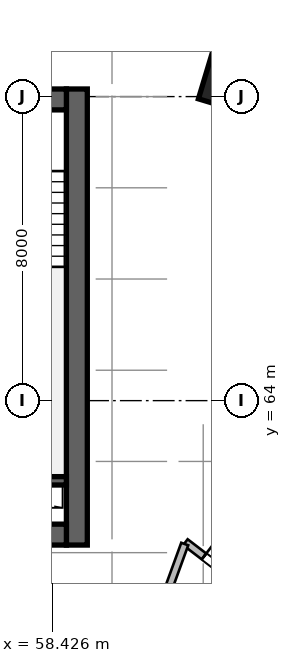
"""IFC4 building model, lengths in metres.
Left out: names, types, materials, properties, quantities, classifications, styles, units other than length and angle.
Written with IfcOpenShell. Run it as: python <this file> out.ifc"""

import sys

from ifc_helpers import new_model, si_unit, direction, frame, frame_2d, origin, origin_2d, place, context, subcontext, project, spatial, rectangle, extrude, source, transform, mapped, element, fill, save


model = new_model("IFC4")
c1 = context("Model", 3, precision=1e-05, world=origin(), true_north=direction((0.0, 1.0)))
c2 = subcontext(c1, "Body", "Model", "MODEL_VIEW")
j1 = project(units=[si_unit("LENGTHUNIT", "METRE"), si_unit("PLANEANGLEUNIT", "RADIAN")], contexts=[c1])
p1 = place(None, origin())
s1 = spatial("IfcSite", under=j1, at=p1, CompositionType="ELEMENT")
p2 = place(p1, origin())
s2 = spatial("IfcBuilding", under=s1, at=p2, CompositionType="ELEMENT")
p3 = place(p2, frame((0.0, 0.0, 42.6)))
s3 = spatial("IfcBuildingStorey", under=s2, at=p3, CompositionType="ELEMENT", Elevation=42.6)
m1 = source(origin(), c2, "Body", "SweptSolid", [
    extrude(rectangle(XDim=12.0, YDim=0.55, at=frame_2d((6.0, 0.0))), origin(), (0.0, 0.0, 1.0), 3.6),
])
p4 = place(p3, frame((59.075, 60.2, 0.0), z_axis=(0.0, 0.0, 1.0), x_axis=(0.0, 1.0, 0.0)))
e1 = element("IfcWall", 1, at=p4, inside=s3, PredefinedType="SHEAR", context=c2, shape_type="MappedRepresentation", body=[
    mapped(m1, transform((0.0, 0.0, 0.0), scale=1.0)),
])
m2 = source(origin(), c2, "Body", "SweptSolid", [
    extrude(rectangle(XDim=21.6, YDim=0.55, at=frame_2d((10.8, 0.0))), origin(), (0.0, 0.0, 1.0), 3.6),
])
p5 = place(p3, frame((37.2, 60.475, 0.0), z_axis=(0.0, 0.0, 1.0), x_axis=(1.0, 0.0, 0.0)))
e2 = element("IfcWall", 2, at=p5, inside=s3, PredefinedType="SHEAR", context=c2, shape_type="MappedRepresentation", body=[
    mapped(m2, transform((0.0, 0.0, 0.0), scale=1.0)),
])
p6 = place(p5, frame((1.1, 0.0, 0.0)))
e3 = element("IfcOpeningElement", 3, at=p6, cuts=e2, PredefinedType="OPENING", context=c2, shape_type="SweptSolid", body=[
    extrude(rectangle(XDim=1.15, YDim=2.15, at=frame_2d((0.575, 1.075))), frame((0.0, 0.285, 0.0), z_axis=(0.0, -1.0, 0.0), x_axis=(1.0, 0.0, 0.0)), (0.0, 0.0, 1.0), 0.57),
])
p7 = place(p5, frame((19.5, 0.0, 0.0)))
e4 = element("IfcOpeningElement", 4, at=p7, cuts=e2, PredefinedType="OPENING", context=c2, shape_type="SweptSolid", body=[
    extrude(rectangle(XDim=0.9, YDim=2.1, at=frame_2d((0.45, 1.05))), frame((0.0, 0.285, 0.0), z_axis=(0.0, -1.0, 0.0), x_axis=(1.0, 0.0, 0.0)), (0.0, 0.0, 1.0), 0.57),
])
p8 = place(p5, frame((12.02, 0.0, 0.0)))
e5 = element("IfcOpeningElement", 5, at=p8, cuts=e2, PredefinedType="OPENING", context=c2, shape_type="SweptSolid", body=[
    extrude(rectangle(XDim=1.6, YDim=2.15, at=frame_2d((0.8, 1.075))), frame((0.0, 0.285, 0.0), z_axis=(0.0, -1.0, 0.0), x_axis=(1.0, 0.0, 0.0)), (0.0, 0.0, 1.0), 0.57),
])
p9 = place(p3, frame((37.2, 71.925, 0.0), z_axis=(0.0, 0.0, 1.0), x_axis=(1.0, 0.0, 0.0)))
e6 = element("IfcWall", 6, at=p9, inside=s3, PredefinedType="SHEAR", context=c2, shape_type="MappedRepresentation", body=[
    mapped(m2, transform((0.0, 0.0, 0.0), scale=1.0)),
])
p10 = place(p9, frame((1.2, 0.0, 0.0)))
e7 = element("IfcOpeningElement", 7, at=p10, cuts=e6, PredefinedType="OPENING", context=c2, shape_type="SweptSolid", body=[
    extrude(rectangle(XDim=0.9, YDim=2.1, at=frame_2d((0.45, 1.05))), frame((0.0, 0.285, 0.0), z_axis=(0.0, -1.0, 0.0), x_axis=(1.0, 0.0, 0.0)), (0.0, 0.0, 1.0), 0.57),
])
p11 = place(p9, frame((14.7, 0.0, 0.0)))
e8 = element("IfcOpeningElement", 8, at=p11, cuts=e6, PredefinedType="OPENING", context=c2, shape_type="SweptSolid", body=[
    extrude(rectangle(XDim=1.2, YDim=2.15, at=frame_2d((0.6, 1.075))), frame((0.0, 0.285, 0.0), z_axis=(0.0, -1.0, 0.0), x_axis=(1.0, 0.0, 0.0)), (0.0, 0.0, 1.0), 0.57),
])
p12 = place(p9, frame((4.15, 0.0, 0.0)))
e9 = element("IfcOpeningElement", 9, at=p12, cuts=e6, PredefinedType="OPENING", context=c2, shape_type="SweptSolid", body=[
    extrude(rectangle(XDim=1.3, YDim=2.15, at=frame_2d((0.65, 1.075))), frame((0.0, 0.285, 0.0), z_axis=(0.0, -1.0, 0.0), x_axis=(1.0, 0.0, 0.0)), (0.0, 0.0, 1.0), 0.57),
])
p13 = place(p9, frame((7.25, 0.0, 0.0)))
e10 = element("IfcOpeningElement", 10, at=p13, cuts=e6, PredefinedType="OPENING", context=c2, shape_type="SweptSolid", body=[
    extrude(rectangle(XDim=0.9, YDim=2.1, at=frame_2d((0.45, 1.05))), frame((0.0, 0.285, 0.0), z_axis=(0.0, -1.0, 0.0), x_axis=(1.0, 0.0, 0.0)), (0.0, 0.0, 1.0), 0.57),
])
p14 = place(p9, frame((10.95, 0.0, 0.0)))
e11 = element("IfcOpeningElement", 11, at=p14, cuts=e6, PredefinedType="OPENING", context=c2, shape_type="SweptSolid", body=[
    extrude(rectangle(XDim=0.9, YDim=2.1, at=frame_2d((0.45, 1.05))), frame((0.0, 0.285, 0.0), z_axis=(0.0, -1.0, 0.0), x_axis=(1.0, 0.0, 0.0)), (0.0, 0.0, 1.0), 0.57),
])
m3 = source(origin(), c2, "Body", "SweptSolid", [
    extrude(rectangle(XDim=3.27, YDim=0.22, at=frame_2d((1.635, 0.0))), origin(), (0.0, 0.0, 1.0), 3.6),
])
p15 = place(p3, frame((55.53, 61.89, 0.0), z_axis=(0.0, 0.0, 1.0), x_axis=(1.0, 0.0, 0.0)))
e12 = element("IfcWall", 12, at=p15, inside=s3, PredefinedType="SHEAR", context=c2, shape_type="MappedRepresentation", body=[
    mapped(m3, transform((0.0, 0.0, 0.0), scale=1.0)),
])
m4 = source(origin(), c2, "Body", "SweptSolid", [
    extrude(rectangle(XDim=1.5, YDim=1.5, at=origin_2d()), origin(), (0.0, 0.0, 1.0), 3.6),
])
p16 = place(p3, frame((63.209, 72.442, 0.0), z_axis=(0.0, 0.0, 1.0), x_axis=(0.288697611798, 0.957420330337, 0.0)))
e13 = element("IfcColumn", 13, at=p16, inside=s3, PredefinedType="COLUMN", context=c2, shape_type="MappedRepresentation", body=[
    mapped(m4, transform((0.0, 0.0, 0.0), scale=1.0)),
])
m5 = source(origin(), c2, "Body", "SweptSolid", [
    extrude(rectangle(XDim=4.546, YDim=0.195, at=frame_2d((2.273, 0.0))), origin(), (0.0, 0.0, 1.0), 3.36),
])
p17 = place(p3, frame((61.931, 60.275, 0.0), z_axis=(0.0, 0.0, 1.0), x_axis=(0.793907931297, -0.608037989457, 0.0)))
e14 = element("IfcWall", 14, at=p17, inside=s3, PredefinedType="PARTITIONING", context=c2, shape_type="MappedRepresentation", body=[
    mapped(m5, transform((0.0, 0.0, 0.0), scale=1.0)),
])
p18 = place(p17, frame((0.616, 0.0, 0.0)))
e15 = element("IfcOpeningElement", 15, at=p18, cuts=e14, PredefinedType="OPENING", context=c2, shape_type="SweptSolid", body=[
    extrude(rectangle(XDim=0.95, YDim=2.15, at=frame_2d((0.475, 1.075))), frame((0.0, 0.107, 0.0), z_axis=(0.0, -1.0, 0.0), x_axis=(1.0, 0.0, 0.0)), (0.0, 0.0, 1.0), 0.215),
])
m6 = source(origin(), c2, "Body", "SweptSolid", [
    extrude(rectangle(XDim=12.196, YDim=0.195, at=frame_2d((6.098, 0.0))), origin(), (0.0, 0.0, 1.0), 3.36),
])
p19 = place(p3, frame((57.742, 48.766, 0.0), z_axis=(0.0, 0.0, 1.0), x_axis=(0.342022711534, 0.939691686031, 0.0)))
e16 = element("IfcWall", 16, at=p19, inside=s3, PredefinedType="PARTITIONING", context=c2, shape_type="MappedRepresentation", body=[
    mapped(m6, transform((0.0, 0.0, 0.0), scale=1.0)),
])
m7 = source(origin(), c2, "Body", "SweptSolid", [
    extrude(rectangle(XDim=0.95, YDim=2.15, at=frame_2d((0.475, 1.075))), frame((0.0, 0.025, 0.0), z_axis=(0.0, -1.0, 0.0), x_axis=(1.0, 0.0, 0.0)), (0.0, 0.0, 1.0), 0.05),
])
p20 = place(p18, origin())
e17 = element("IfcDoor", 17, at=p20, inside=s3, OperationType="SINGLE_SWING_LEFT", PredefinedType="DOOR", context=c2, shape_type="MappedRepresentation", body=[
    mapped(m7, transform((0.0, 0.0, 0.0), scale=1.0)),
])
fill(e15, e17)
save(model, sys.argv[1])
